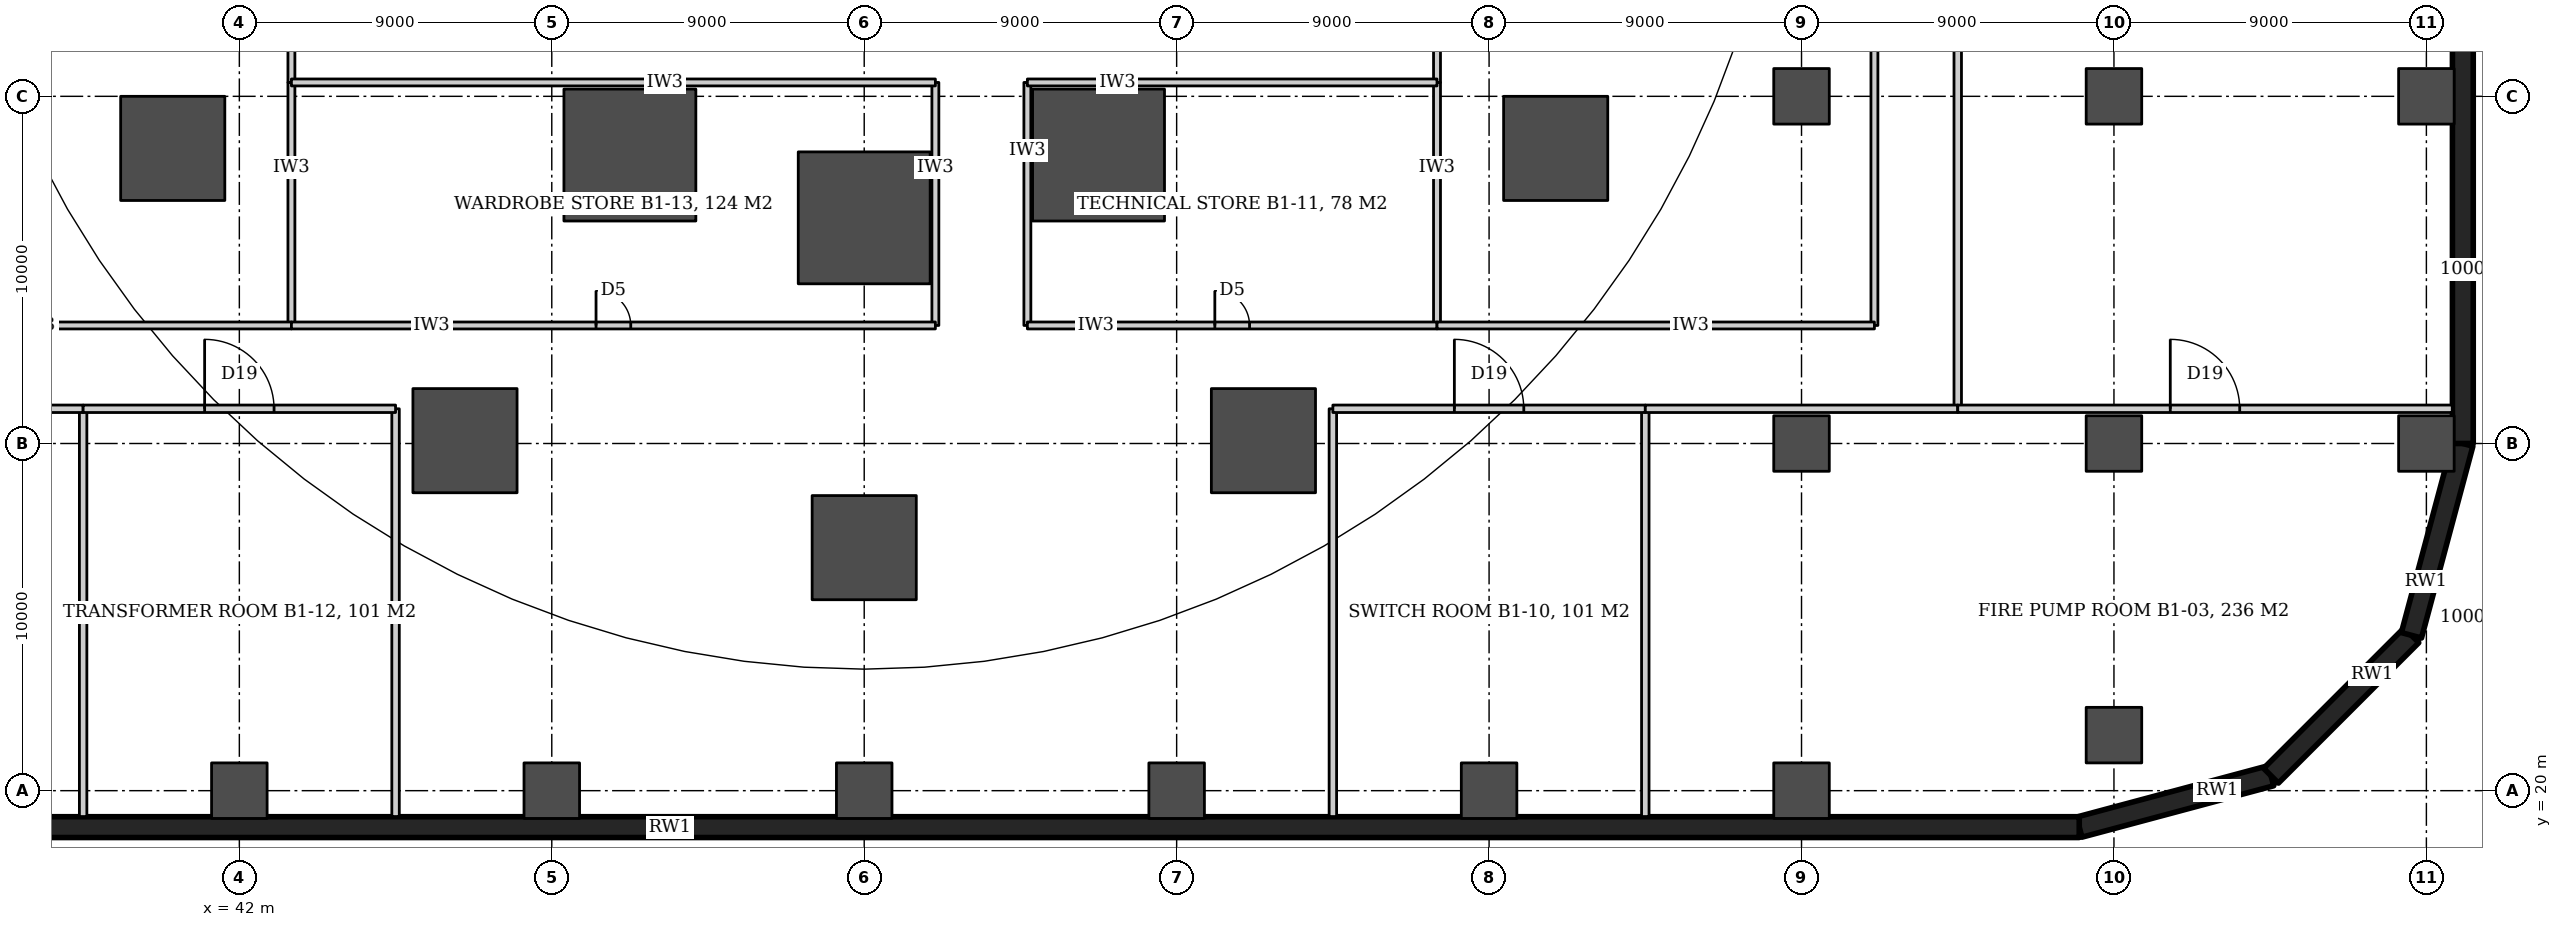
"""IFC4 building model, lengths in metres.
Left out: names, types, materials, properties, quantities, classifications, styles, units other than length and angle.
Written with IfcOpenShell. Run it as: python <this file> out.ifc"""

import sys

from ifc_helpers import new_model, si_unit, direction, frame, frame_2d, origin, origin_2d, place, context, subcontext, project, spatial, rectangle, circle, extrude, element, fill, save


model = new_model("IFC4")
c1 = context("Model", 3, precision=1e-05, world=origin(), true_north=direction((0.0, 1.0)))
c2 = subcontext(c1, "Body", "Model", "MODEL_VIEW")
j1 = project(units=[si_unit("LENGTHUNIT", "METRE"), si_unit("PLANEANGLEUNIT", "RADIAN")], contexts=[c1])
p1 = place(None, origin())
s1 = spatial("IfcSite", under=j1, at=p1, CompositionType="ELEMENT")
p2 = place(p1, origin())
s2 = spatial("IfcBuilding", under=s1, at=p2, CompositionType="ELEMENT")
p3 = place(p2, frame((0.0, 0.0, -6.0)))
s3 = spatial("IfcBuildingStorey", under=s2, at=p3, CompositionType="ELEMENT", Elevation=-6.0)
p4 = place(p3, frame((95.0, 18.95, -0.5), z_axis=(0.0, 0.0, 1.0), x_axis=(0.965922520654, 0.258831381584, 0.0)))
e1 = element("IfcWall", 1, at=p4, inside=s3, PredefinedType="SOLIDWALL", context=c2, shape_type="SweptSolid", body=[
    extrude(rectangle(XDim=5.72, YDim=0.6, at=frame_2d((2.86, 0.0))), origin(), (0.0, 0.0, 1.0), 6.2),
])
p5 = place(p3, frame((100.525, 20.43, -0.5), z_axis=(0.0, 0.0, 1.0), x_axis=(0.707106781187, 0.707106781187, 0.0)))
e2 = element("IfcWall", 2, at=p5, inside=s3, PredefinedType="SOLIDWALL", context=c2, shape_type="SweptSolid", body=[
    extrude(rectangle(XDim=5.72, YDim=0.6, at=frame_2d((2.86, 0.0))), origin(), (0.0, 0.0, 1.0), 6.2),
])
p6 = place(p3, frame((104.57, 24.475, -0.5), z_axis=(0.0, 0.0, 1.0), x_axis=(0.258831381584, 0.965922520654, 0.0)))
e3 = element("IfcWall", 3, at=p6, inside=s3, PredefinedType="SOLIDWALL", context=c2, shape_type="SweptSolid", body=[
    extrude(rectangle(XDim=5.72, YDim=0.6, at=frame_2d((2.86, 0.0))), origin(), (0.0, 0.0, 1.0), 6.2),
])
p7 = place(p3, frame((106.05, 30.0, -0.5), z_axis=(0.0, 0.0, 1.0), x_axis=(0.0, 1.0, 0.0)))
e4 = element("IfcWall", 4, at=p7, inside=s3, PredefinedType="SOLIDWALL", context=c2, shape_type="SweptSolid", body=[
    extrude(rectangle(XDim=40.0, YDim=0.6, at=frame_2d((20.0, 0.0))), origin(), (0.0, 0.0, 1.0), 6.2),
])
p8 = place(p3, frame((25.0, 18.95, -0.5), z_axis=(0.0, 0.0, 1.0), x_axis=(1.0, 0.0, 0.0)))
e5 = element("IfcWall", 5, at=p8, inside=s3, PredefinedType="SOLIDWALL", context=c2, shape_type="SweptSolid", body=[
    extrude(rectangle(XDim=70.0, YDim=0.6, at=frame_2d((35.0, 0.0))), origin(), (0.0, 0.0, 1.0), 6.2),
])
for number, where, z_axis, x_axis in (
    (6, (42.0, 20.0, -0.5), (0.0, 0.0, 1.0), (1.0, 0.0, 0.0)),
    (7, (51.0, 20.0, -0.5), (0.0, 0.0, 1.0), (1.0, 0.0, 0.0)),
    (8, (60.0, 20.0, -0.5), (0.0, 0.0, 1.0), (1.0, 0.0, 0.0)),
    (9, (69.0, 20.0, -0.5), (0.0, 0.0, 1.0), (1.0, 0.0, 0.0)),
    (10, (78.0, 20.0, -0.5), (0.0, 0.0, 1.0), (1.0, 0.0, 0.0)),
    (11, (87.0, 20.0, -0.5), (0.0, 0.0, 1.0), (1.0, 0.0, 0.0)),
    (12, (96.0, 21.6, -0.5), (0.0, 0.0, 1.0), (1.0, 0.0, 0.0)),
    (13, (87.0, 30.0, -0.5), (0.0, 0.0, 1.0), (1.0, 0.0, 0.0)),
    (14, (96.0, 30.0, -0.5), (0.0, 0.0, 1.0), (1.0, 0.0, 0.0)),
    (15, (105.0, 30.0, -0.5), (0.0, 0.0, 1.0), (1.0, 0.0, 0.0)),
    (16, (87.0, 40.0, -0.5), (0.0, 0.0, 1.0), (1.0, 0.0, 0.0)),
    (17, (96.0, 40.0, -0.5), (0.0, 0.0, 1.0), (1.0, 0.0, 0.0)),
    (18, (105.0, 40.0, -0.5), (0.0, 0.0, 1.0), (1.0, 0.0, 0.0)),
):
    element("IfcColumn", number, at=place(p3, frame(where, z_axis=z_axis, x_axis=x_axis)), inside=s3, PredefinedType="COLUMN", context=c2, shape_type="SweptSolid", body=[
        extrude(rectangle(XDim=1.6, YDim=1.6, at=origin_2d()), origin(), (0.0, 0.0, 1.0), 6.5),
    ])
for number, where, z_axis, x_axis in (
    (19, (40.081, 38.5, 0.0), (0.0, 0.0, 1.0), (1.0, 0.0, 0.0)),
    (20, (48.5, 30.081, 0.0), (0.0, 0.0, 1.0), (1.0, 0.0, 0.0)),
    (21, (60.0, 27.0, 0.0), (0.0, 0.0, 1.0), (1.0, 0.0, 0.0)),
    (22, (71.5, 30.081, 0.0), (0.0, 0.0, 1.0), (1.0, 0.0, 0.0)),
    (23, (79.919, 38.5, 0.0), (0.0, 0.0, 1.0), (1.0, 0.0, 0.0)),
):
    element("IfcColumn", number, at=place(p3, frame(where, z_axis=z_axis, x_axis=x_axis)), inside=s3, PredefinedType="COLUMN", context=c2, shape_type="SweptSolid", body=[
        extrude(circle(Radius=1.5, at=origin_2d()), origin(), (0.0, 0.0, 1.0), 6.0),
    ])
for number, where, z_axis, x_axis in (
    (24, (53.25, 38.309, 0.0), (0.0, 0.0, 1.0), (1.0, 0.0, 0.0)),
    (25, (60.0, 36.5, 0.0), (0.0, 0.0, 1.0), (1.0, 0.0, 0.0)),
    (26, (66.75, 38.309, 0.0), (0.0, 0.0, 1.0), (1.0, 0.0, 0.0)),
):
    element("IfcColumn", number, at=place(p3, frame(where, z_axis=z_axis, x_axis=x_axis)), inside=s3, PredefinedType="COLUMN", context=c2, shape_type="SweptSolid", body=[
        extrude(circle(Radius=1.9, at=origin_2d()), origin(), (0.0, 0.0, 1.0), 6.0),
    ])
p9 = place(p3, frame((37.5, 19.255, 0.0), z_axis=(0.0, 0.0, 1.0), x_axis=(0.0, 1.0, 0.0)))
e27 = element("IfcWall", 27, at=p9, inside=s3, PredefinedType="PARTITIONING", context=c2, shape_type="SweptSolid", body=[
    extrude(rectangle(XDim=11.745, YDim=0.215, at=frame_2d((5.873, 0.0))), origin(), (0.0, 0.0, 1.0), 3.68),
])
p10 = place(p3, frame((43.5, 33.4, 0.0), z_axis=(0.0, 0.0, 1.0), x_axis=(0.0, 1.0, 0.0)))
e28 = element("IfcWall", 28, at=p10, inside=s3, PredefinedType="PARTITIONING", context=c2, shape_type="SweptSolid", body=[
    extrude(rectangle(XDim=7.0, YDim=0.2, at=frame_2d((3.5, 0.0))), origin(), (0.0, 0.0, 1.0), 3.08),
])
p11 = place(p3, frame((43.5, 40.4, 0.0), z_axis=(0.0, 0.0, 1.0), x_axis=(0.0, 1.0, 0.0)))
e29 = element("IfcWall", 29, at=p11, inside=s3, PredefinedType="PARTITIONING", context=c2, shape_type="SweptSolid", body=[
    extrude(rectangle(XDim=19.2, YDim=0.2, at=frame_2d((9.6, 0.0))), origin(), (0.0, 0.0, 1.0), 3.08),
])
p12 = place(p11, frame((9.1, 0.0, 0.0)))
e30 = element("IfcOpeningElement", 30, at=p12, cuts=e29, PredefinedType="OPENING", context=c2, shape_type="SweptSolid", body=[
    extrude(rectangle(XDim=1.0, YDim=2.1, at=frame_2d((0.5, 1.05))), frame((0.0, 0.11, 0.0), z_axis=(0.0, -1.0, 0.0), x_axis=(1.0, 0.0, 0.0)), (0.0, 0.0, 1.0), 0.22),
])
p13 = place(p3, frame((46.5, 19.255, 0.0), z_axis=(0.0, 0.0, 1.0), x_axis=(0.0, 1.0, 0.0)))
e31 = element("IfcWall", 31, at=p13, inside=s3, PredefinedType="PARTITIONING", context=c2, shape_type="SweptSolid", body=[
    extrude(rectangle(XDim=11.745, YDim=0.215, at=frame_2d((5.873, 0.0))), origin(), (0.0, 0.0, 1.0), 3.68),
])
p14 = place(p3, frame((62.05, 33.4, 0.0), z_axis=(0.0, 0.0, 1.0), x_axis=(0.0, 1.0, 0.0)))
e32 = element("IfcWall", 32, at=p14, inside=s3, PredefinedType="PARTITIONING", context=c2, shape_type="SweptSolid", body=[
    extrude(rectangle(XDim=7.0, YDim=0.2, at=frame_2d((3.5, 0.0))), origin(), (0.0, 0.0, 1.0), 3.08),
])
p15 = place(p3, frame((64.7, 33.4, 0.0), z_axis=(0.0, 0.0, 1.0), x_axis=(0.0, 1.0, 0.0)))
e33 = element("IfcWall", 33, at=p15, inside=s3, PredefinedType="PARTITIONING", context=c2, shape_type="SweptSolid", body=[
    extrude(rectangle(XDim=7.0, YDim=0.2, at=frame_2d((3.5, 0.0))), origin(), (0.0, 0.0, 1.0), 2.48),
])
p16 = place(p3, frame((73.5, 19.255, 0.0), z_axis=(0.0, 0.0, 1.0), x_axis=(0.0, 1.0, 0.0)))
e34 = element("IfcWall", 34, at=p16, inside=s3, PredefinedType="PARTITIONING", context=c2, shape_type="SweptSolid", body=[
    extrude(rectangle(XDim=11.745, YDim=0.215, at=frame_2d((5.873, 0.0))), origin(), (0.0, 0.0, 1.0), 3.68),
])
p17 = place(p3, frame((76.5, 33.4, 0.0), z_axis=(0.0, 0.0, 1.0), x_axis=(0.0, 1.0, 0.0)))
e35 = element("IfcWall", 35, at=p17, inside=s3, PredefinedType="PARTITIONING", context=c2, shape_type="SweptSolid", body=[
    extrude(rectangle(XDim=7.0, YDim=0.2, at=frame_2d((3.5, 0.0))), origin(), (0.0, 0.0, 1.0), 3.08),
])
p18 = place(p3, frame((76.5, 40.4, 0.0), z_axis=(0.0, 0.0, 1.0), x_axis=(0.0, 1.0, 0.0)))
e36 = element("IfcWall", 36, at=p18, inside=s3, PredefinedType="PARTITIONING", context=c2, shape_type="SweptSolid", body=[
    extrude(rectangle(XDim=19.2, YDim=0.2, at=frame_2d((9.6, 0.0))), origin(), (0.0, 0.0, 1.0), 3.08),
])
p19 = place(p18, frame((9.1, 0.0, 0.0)))
e37 = element("IfcOpeningElement", 37, at=p19, cuts=e36, PredefinedType="OPENING", context=c2, shape_type="SweptSolid", body=[
    extrude(rectangle(XDim=1.0, YDim=2.1, at=frame_2d((0.5, 1.05))), frame((0.0, 0.11, 0.0), z_axis=(0.0, -1.0, 0.0), x_axis=(1.0, 0.0, 0.0)), (0.0, 0.0, 1.0), 0.22),
])
p20 = place(p3, frame((82.5, 19.255, 0.0), z_axis=(0.0, 0.0, 1.0), x_axis=(0.0, 1.0, 0.0)))
e38 = element("IfcWall", 38, at=p20, inside=s3, PredefinedType="PARTITIONING", context=c2, shape_type="SweptSolid", body=[
    extrude(rectangle(XDim=11.745, YDim=0.215, at=frame_2d((5.873, 0.0))), origin(), (0.0, 0.0, 1.0), 3.68),
])
p21 = place(p3, frame((89.1, 33.4, 0.0), z_axis=(0.0, 0.0, 1.0), x_axis=(0.0, 1.0, 0.0)))
e39 = element("IfcWall", 39, at=p21, inside=s3, PredefinedType="PARTITIONING", context=c2, shape_type="SweptSolid", body=[
    extrude(rectangle(XDim=32.7, YDim=0.2, at=frame_2d((16.35, 0.0))), origin(), (0.0, 0.0, 1.0), 3.68),
])
p22 = place(p3, frame((91.5, 31.0, 0.0), z_axis=(0.0, 0.0, 1.0), x_axis=(0.0, 1.0, 0.0)))
e40 = element("IfcWall", 40, at=p22, inside=s3, PredefinedType="PARTITIONING", context=c2, shape_type="SweptSolid", body=[
    extrude(rectangle(XDim=39.95, YDim=0.215, at=frame_2d((19.975, 0.0))), origin(), (0.0, 0.0, 1.0), 3.68),
])
p23 = place(p22, frame((18.975, 0.0, 0.0)))
e41 = element("IfcOpeningElement", 41, at=p23, cuts=e40, PredefinedType="OPENING", context=c2, shape_type="SweptSolid", body=[
    extrude(rectangle(XDim=2.0, YDim=2.4, at=frame_2d((1.0, 1.2))), frame((0.0, 0.117, 0.0), z_axis=(0.0, -1.0, 0.0), x_axis=(1.0, 0.0, 0.0)), (0.0, 0.0, 1.0), 0.235),
])
p24 = place(p3, frame((28.5, 31.0, 0.0), z_axis=(0.0, 0.0, 1.0), x_axis=(1.0, 0.0, 0.0)))
e42 = element("IfcWall", 42, at=p24, inside=s3, PredefinedType="PARTITIONING", context=c2, shape_type="SweptSolid", body=[
    extrude(rectangle(XDim=9.0, YDim=0.215, at=frame_2d((4.5, 0.0))), origin(), (0.0, 0.0, 1.0), 3.68),
])
p25 = place(p3, frame((37.5, 31.0, 0.0), z_axis=(0.0, 0.0, 1.0), x_axis=(1.0, 0.0, 0.0)))
e43 = element("IfcWall", 43, at=p25, inside=s3, PredefinedType="PARTITIONING", context=c2, shape_type="SweptSolid", body=[
    extrude(rectangle(XDim=9.0, YDim=0.215, at=frame_2d((4.5, 0.0))), origin(), (0.0, 0.0, 1.0), 3.68),
])
p26 = place(p25, frame((3.5, 0.0, 0.0)))
e44 = element("IfcOpeningElement", 44, at=p26, cuts=e43, PredefinedType="OPENING", context=c2, shape_type="SweptSolid", body=[
    extrude(rectangle(XDim=2.0, YDim=2.4, at=frame_2d((1.0, 1.2))), frame((0.0, 0.117, 0.0), z_axis=(0.0, -1.0, 0.0), x_axis=(1.0, 0.0, 0.0)), (0.0, 0.0, 1.0), 0.235),
])
p27 = place(p3, frame((73.5, 31.0, 0.0), z_axis=(0.0, 0.0, 1.0), x_axis=(1.0, 0.0, 0.0)))
e45 = element("IfcWall", 45, at=p27, inside=s3, PredefinedType="PARTITIONING", context=c2, shape_type="SweptSolid", body=[
    extrude(rectangle(XDim=9.0, YDim=0.215, at=frame_2d((4.5, 0.0))), origin(), (0.0, 0.0, 1.0), 3.68),
])
p28 = place(p27, frame((3.5, 0.0, 0.0)))
e46 = element("IfcOpeningElement", 46, at=p28, cuts=e45, PredefinedType="OPENING", context=c2, shape_type="SweptSolid", body=[
    extrude(rectangle(XDim=2.0, YDim=2.4, at=frame_2d((1.0, 1.2))), frame((0.0, 0.117, 0.0), z_axis=(0.0, -1.0, 0.0), x_axis=(1.0, 0.0, 0.0)), (0.0, 0.0, 1.0), 0.235),
])
p29 = place(p3, frame((82.5, 31.0, 0.0), z_axis=(0.0, 0.0, 1.0), x_axis=(1.0, 0.0, 0.0)))
e47 = element("IfcWall", 47, at=p29, inside=s3, PredefinedType="PARTITIONING", context=c2, shape_type="SweptSolid", body=[
    extrude(rectangle(XDim=9.0, YDim=0.215, at=frame_2d((4.5, 0.0))), origin(), (0.0, 0.0, 1.0), 3.68),
])
p30 = place(p3, frame((91.5, 31.0, 0.0), z_axis=(0.0, 0.0, 1.0), x_axis=(1.0, 0.0, 0.0)))
e48 = element("IfcWall", 48, at=p30, inside=s3, PredefinedType="PARTITIONING", context=c2, shape_type="SweptSolid", body=[
    extrude(rectangle(XDim=14.245, YDim=0.215, at=frame_2d((7.123, 0.0))), origin(), (0.0, 0.0, 1.0), 3.68),
])
p31 = place(p30, frame((6.123, 0.0, 0.0)))
e49 = element("IfcOpeningElement", 49, at=p31, cuts=e48, PredefinedType="OPENING", context=c2, shape_type="SweptSolid", body=[
    extrude(rectangle(XDim=2.0, YDim=2.4, at=frame_2d((1.0, 1.2))), frame((0.0, 0.117, 0.0), z_axis=(0.0, -1.0, 0.0), x_axis=(1.0, 0.0, 0.0)), (0.0, 0.0, 1.0), 0.235),
])
p32 = place(p3, frame((30.9, 33.4, 0.0), z_axis=(0.0, 0.0, 1.0), x_axis=(1.0, 0.0, 0.0)))
e50 = element("IfcWall", 50, at=p32, inside=s3, PredefinedType="PARTITIONING", context=c2, shape_type="SweptSolid", body=[
    extrude(rectangle(XDim=12.6, YDim=0.2, at=frame_2d((6.3, 0.0))), origin(), (0.0, 0.0, 1.0), 3.68),
])
p33 = place(p3, frame((43.5, 33.4, 0.0), z_axis=(0.0, 0.0, 1.0), x_axis=(1.0, 0.0, 0.0)))
e51 = element("IfcWall", 51, at=p33, inside=s3, PredefinedType="PARTITIONING", context=c2, shape_type="SweptSolid", body=[
    extrude(rectangle(XDim=18.55, YDim=0.2, at=frame_2d((9.275, 0.0))), origin(), (0.0, 0.0, 1.0), 3.08),
])
p34 = place(p33, frame((8.775, 0.0, 0.0)))
e52 = element("IfcOpeningElement", 52, at=p34, cuts=e51, PredefinedType="OPENING", context=c2, shape_type="SweptSolid", body=[
    extrude(rectangle(XDim=1.0, YDim=2.1, at=frame_2d((0.5, 1.05))), frame((0.0, 0.11, 0.0), z_axis=(0.0, -1.0, 0.0), x_axis=(1.0, 0.0, 0.0)), (0.0, 0.0, 1.0), 0.22),
])
p35 = place(p3, frame((64.7, 33.4, 0.0), z_axis=(0.0, 0.0, 1.0), x_axis=(1.0, 0.0, 0.0)))
e53 = element("IfcWall", 53, at=p35, inside=s3, PredefinedType="PARTITIONING", context=c2, shape_type="SweptSolid", body=[
    extrude(rectangle(XDim=11.8, YDim=0.2, at=frame_2d((5.9, 0.0))), origin(), (0.0, 0.0, 1.0), 3.08),
])
p36 = place(p35, frame((5.4, 0.0, 0.0)))
e54 = element("IfcOpeningElement", 54, at=p36, cuts=e53, PredefinedType="OPENING", context=c2, shape_type="SweptSolid", body=[
    extrude(rectangle(XDim=1.0, YDim=2.1, at=frame_2d((0.5, 1.05))), frame((0.0, 0.11, 0.0), z_axis=(0.0, -1.0, 0.0), x_axis=(1.0, 0.0, 0.0)), (0.0, 0.0, 1.0), 0.22),
])
p37 = place(p3, frame((76.5, 33.4, 0.0), z_axis=(0.0, 0.0, 1.0), x_axis=(1.0, 0.0, 0.0)))
e55 = element("IfcWall", 55, at=p37, inside=s3, PredefinedType="PARTITIONING", context=c2, shape_type="SweptSolid", body=[
    extrude(rectangle(XDim=12.6, YDim=0.2, at=frame_2d((6.3, 0.0))), origin(), (0.0, 0.0, 1.0), 3.68),
])
p38 = place(p3, frame((43.5, 40.4, 0.0), z_axis=(0.0, 0.0, 1.0), x_axis=(1.0, 0.0, 0.0)))
e56 = element("IfcWall", 56, at=p38, inside=s3, PredefinedType="PARTITIONING", context=c2, shape_type="SweptSolid", body=[
    extrude(rectangle(XDim=18.55, YDim=0.2, at=frame_2d((9.275, 0.0))), origin(), (0.0, 0.0, 1.0), 2.48),
])
p39 = place(p3, frame((64.7, 40.4, 0.0), z_axis=(0.0, 0.0, 1.0), x_axis=(1.0, 0.0, 0.0)))
e57 = element("IfcWall", 57, at=p39, inside=s3, PredefinedType="PARTITIONING", context=c2, shape_type="SweptSolid", body=[
    extrude(rectangle(XDim=11.8, YDim=0.2, at=frame_2d((5.9, 0.0))), origin(), (0.0, 0.0, 1.0), 2.48),
])
p40 = place(p26, origin())
e58 = element("IfcDoor", 58, at=p40, inside=s3, OperationType="DOUBLE_DOOR_DOUBLE_SWING", PredefinedType="DOOR", context=c2, shape_type="SweptSolid", body=[
    extrude(rectangle(XDim=2.0, YDim=2.4, at=frame_2d((1.0, 1.2))), frame((0.0, 0.025, 0.0), z_axis=(0.0, -1.0, 0.0), x_axis=(1.0, 0.0, 0.0)), (0.0, 0.0, 1.0), 0.05),
])
fill(e44, e58)
p41 = place(p28, origin())
e59 = element("IfcDoor", 59, at=p41, inside=s3, OperationType="DOUBLE_DOOR_DOUBLE_SWING", PredefinedType="DOOR", context=c2, shape_type="SweptSolid", body=[
    extrude(rectangle(XDim=2.0, YDim=2.4, at=frame_2d((1.0, 1.2))), frame((0.0, 0.025, 0.0), z_axis=(0.0, -1.0, 0.0), x_axis=(1.0, 0.0, 0.0)), (0.0, 0.0, 1.0), 0.05),
])
fill(e46, e59)
p42 = place(p31, origin())
e60 = element("IfcDoor", 60, at=p42, inside=s3, OperationType="DOUBLE_DOOR_DOUBLE_SWING", PredefinedType="DOOR", context=c2, shape_type="SweptSolid", body=[
    extrude(rectangle(XDim=2.0, YDim=2.4, at=frame_2d((1.0, 1.2))), frame((0.0, 0.025, 0.0), z_axis=(0.0, -1.0, 0.0), x_axis=(1.0, 0.0, 0.0)), (0.0, 0.0, 1.0), 0.05),
])
fill(e49, e60)
p43 = place(p34, origin())
e61 = element("IfcDoor", 61, at=p43, inside=s3, OperationType="SINGLE_SWING_LEFT", PredefinedType="DOOR", context=c2, shape_type="SweptSolid", body=[
    extrude(rectangle(XDim=1.0, YDim=2.1, at=frame_2d((0.5, 1.05))), frame((0.0, 0.025, 0.0), z_axis=(0.0, -1.0, 0.0), x_axis=(1.0, 0.0, 0.0)), (0.0, 0.0, 1.0), 0.05),
])
fill(e52, e61)
p44 = place(p36, origin())
e62 = element("IfcDoor", 62, at=p44, inside=s3, OperationType="SINGLE_SWING_LEFT", PredefinedType="DOOR", context=c2, shape_type="SweptSolid", body=[
    extrude(rectangle(XDim=1.0, YDim=2.1, at=frame_2d((0.5, 1.05))), frame((0.0, 0.025, 0.0), z_axis=(0.0, -1.0, 0.0), x_axis=(1.0, 0.0, 0.0)), (0.0, 0.0, 1.0), 0.05),
])
fill(e54, e62)
save(model, sys.argv[1])
